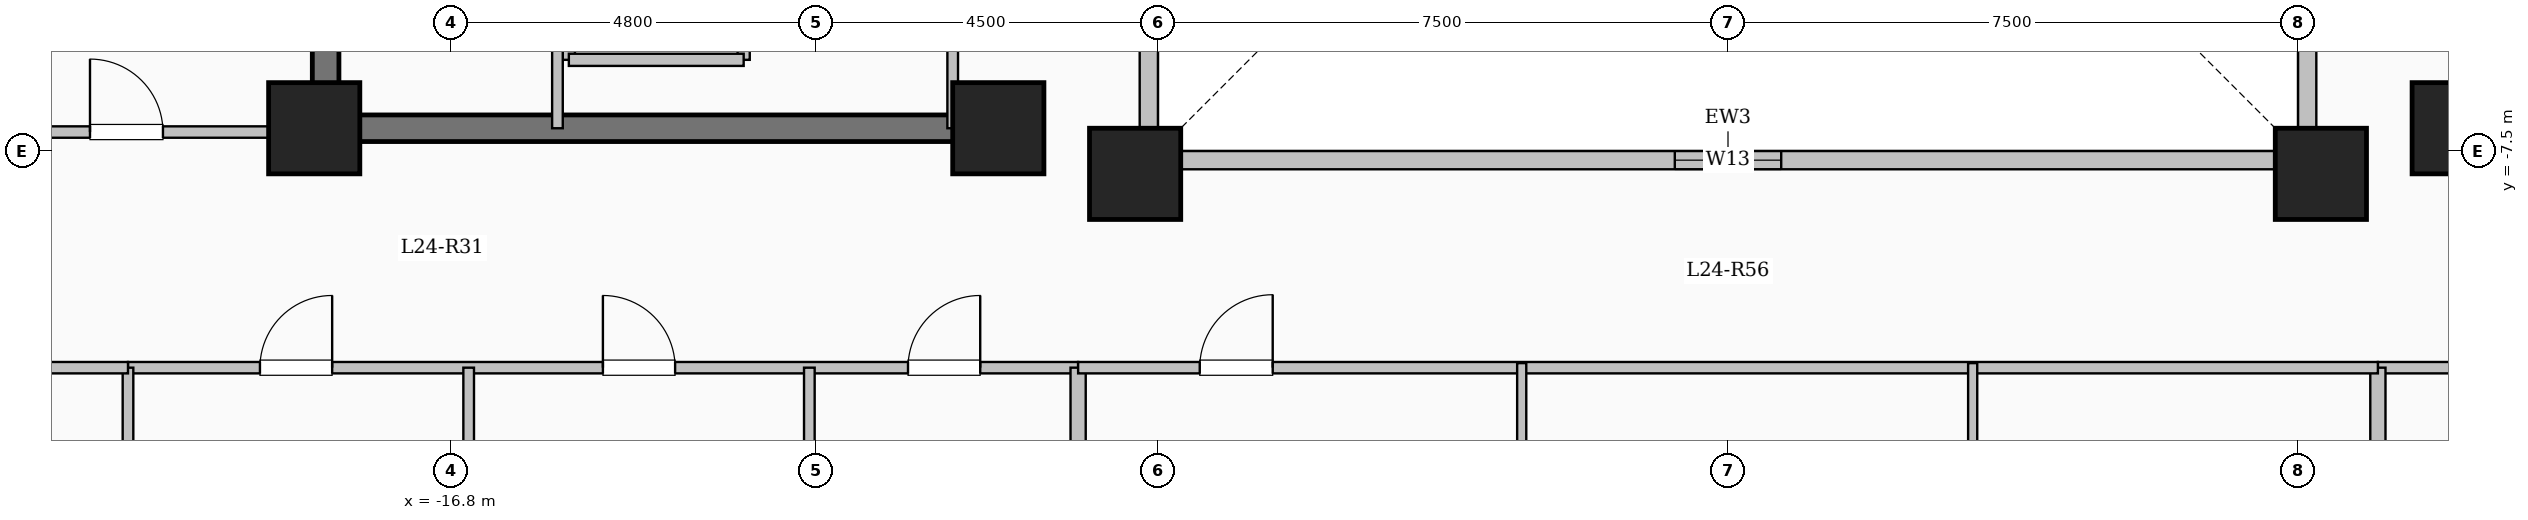
"""IFC4 building model, lengths in metres.
Left out: names, types, materials, properties, quantities, classifications, styles, units other than length and angle.
Written with IfcOpenShell. Run it as: python <this file> out.ifc"""

import sys

from ifc_helpers import new_model, si_unit, direction, frame, frame_2d, origin, origin_2d, place, context, subcontext, project, spatial, rectangle, extrude, element, fill, save


model = new_model("IFC4")
c1 = context("Model", 3, precision=1e-05, world=origin(), true_north=direction((0.0, 1.0)))
c2 = subcontext(c1, "Body", "Model", "MODEL_VIEW")
j1 = project(units=[si_unit("LENGTHUNIT", "METRE"), si_unit("PLANEANGLEUNIT", "RADIAN")], contexts=[c1])
p1 = place(None, origin())
s1 = spatial("IfcSite", under=j1, at=p1, CompositionType="ELEMENT")
p2 = place(p1, origin())
s2 = spatial("IfcBuilding", under=s1, at=p2, CompositionType="ELEMENT")
p3 = place(p2, frame((0.0, 0.0, 91.7)))
s3 = spatial("IfcBuildingStorey", under=s2, at=p3, CompositionType="ELEMENT", Elevation=91.7)
for number, where, z_axis, x_axis in (
    (1, (-7.8, -7.8, 0.0), (0.0, 0.0, 1.0), (1.0, 0.0, 0.0)),
    (2, (7.8, -7.8, 0.0), (0.0, 0.0, 1.0), (1.0, 0.0, 0.0)),
    (3, (-9.6, -7.2, 0.0), (0.0, 0.0, 1.0), (1.0, 0.0, 0.0)),
    (4, (9.6, -7.2, 0.0), (0.0, 0.0, 1.0), (1.0, 0.0, 0.0)),
    (5, (-18.6, -7.2, 0.0), (0.0, 0.0, 1.0), (1.0, 0.0, 0.0)),
):
    element("IfcColumn", number, at=place(p3, frame(where, z_axis=z_axis, x_axis=x_axis)), inside=s3, PredefinedType="COLUMN", context=c2, shape_type="SweptSolid", body=[
        extrude(rectangle(XDim=1.2, YDim=1.2, at=origin_2d()), origin(), (0.0, 0.0, 1.0), 3.35),
    ])
p4 = place(p3, frame((-7.62, -7.62, 0.0), z_axis=(0.0, 0.0, 1.0), x_axis=(1.0, 0.0, 0.0)))
e6 = element("IfcWall", 6, at=p4, inside=s3, PredefinedType="SOLIDWALL", context=c2, shape_type="SweptSolid", body=[
    extrude(rectangle(XDim=15.24, YDim=0.24, at=frame_2d((7.62, 0.0))), origin(), (0.0, 0.0, 1.0), 3.1),
])
p5 = place(p4, frame((6.92, 0.0, 0.95)))
e7 = element("IfcOpeningElement", 7, at=p5, cuts=e6, PredefinedType="OPENING", context=c2, shape_type="SweptSolid", body=[
    extrude(rectangle(XDim=1.4, YDim=1.5, at=frame_2d((0.7, 0.75))), frame((0.0, 0.13, 0.0), z_axis=(0.0, -1.0, 0.0), x_axis=(1.0, 0.0, 0.0)), (0.0, 0.0, 1.0), 0.26),
])
p6 = place(p3, frame((7.62, -7.62, 0.0), z_axis=(0.0, 0.0, 1.0), x_axis=(0.0, 1.0, 0.0)))
e8 = element("IfcWall", 8, at=p6, inside=s3, PredefinedType="SOLIDWALL", context=c2, shape_type="SweptSolid", body=[
    extrude(rectangle(XDim=15.24, YDim=0.24, at=frame_2d((7.62, 0.0))), origin(), (0.0, 0.0, 1.0), 3.1),
])
p7 = place(p6, frame((6.92, 0.0, 0.95)))
e9 = element("IfcOpeningElement", 9, at=p7, cuts=e8, PredefinedType="OPENING", context=c2, shape_type="SweptSolid", body=[
    extrude(rectangle(XDim=1.4, YDim=1.5, at=frame_2d((0.7, 0.75))), frame((0.0, 0.13, 0.0), z_axis=(0.0, -1.0, 0.0), x_axis=(1.0, 0.0, 0.0)), (0.0, 0.0, 1.0), 0.26),
])
p8 = place(p3, frame((-7.62, 7.62, 0.0), z_axis=(0.0, 0.0, 1.0), x_axis=(0.0, -1.0, 0.0)))
e10 = element("IfcWall", 10, at=p8, inside=s3, PredefinedType="SOLIDWALL", context=c2, shape_type="SweptSolid", body=[
    extrude(rectangle(XDim=15.24, YDim=0.24, at=frame_2d((7.62, 0.0))), origin(), (0.0, 0.0, 1.0), 3.1),
])
p9 = place(p8, frame((6.92, 0.0, 0.95)))
e11 = element("IfcOpeningElement", 11, at=p9, cuts=e10, PredefinedType="OPENING", context=c2, shape_type="SweptSolid", body=[
    extrude(rectangle(XDim=1.4, YDim=1.5, at=frame_2d((0.7, 0.75))), frame((0.0, 0.13, 0.0), z_axis=(0.0, -1.0, 0.0), x_axis=(1.0, 0.0, 0.0)), (0.0, 0.0, 1.0), 0.26),
])
for number, where, z_axis, x_axis in (
    (12, (-15.25, -6.3, 0.0), (0.0, 0.0, 1.0), (0.0, 1.0, 0.0)),
    (13, (-12.95, -6.3, 0.0), (0.0, 0.0, 1.0), (0.0, 1.0, 0.0)),
):
    element("IfcWall", number, at=place(p3, frame(where, z_axis=z_axis, x_axis=x_axis)), inside=s3, PredefinedType="SOLIDWALL", context=c2, shape_type="SweptSolid", body=[
        extrude(rectangle(XDim=2.6, YDim=0.16, at=frame_2d((1.3, 0.0))), origin(), (0.0, 0.0, 1.0), 3.1),
    ])
p10 = place(p3, frame((-15.25, -6.3, 0.0), z_axis=(0.0, 0.0, 1.0), x_axis=(1.0, 0.0, 0.0)))
e14 = element("IfcWall", 14, at=p10, inside=s3, PredefinedType="SOLIDWALL", context=c2, shape_type="SweptSolid", body=[
    extrude(rectangle(XDim=2.3, YDim=0.16, at=frame_2d((1.15, 0.0))), origin(), (0.0, 0.0, 1.0), 3.1),
])
p11 = place(p3, frame((-18.45, -7.375, 0.0), z_axis=(0.0, 0.0, 1.0), x_axis=(0.0, 1.0, 0.0)))
e15 = element("IfcWall", 15, at=p11, inside=s3, PredefinedType="SHEAR", context=c2, shape_type="SweptSolid", body=[
    extrude(rectangle(XDim=14.05, YDim=0.35, at=frame_2d((7.025, 0.0))), origin(), (0.0, 0.0, 1.0), 3.35),
])
p12 = place(p3, frame((-18.625, -7.2, 0.0), z_axis=(0.0, 0.0, 1.0), x_axis=(1.0, 0.0, 0.0)))
e16 = element("IfcWall", 16, at=p12, inside=s3, PredefinedType="SHEAR", context=c2, shape_type="SweptSolid", body=[
    extrude(rectangle(XDim=8.55, YDim=0.35, at=frame_2d((4.275, 0.0))), origin(), (0.0, 0.0, 1.0), 3.35),
])
p13 = place(p3, frame((-15.4, -7.2, 0.0), z_axis=(0.0, 0.0, 1.0), x_axis=(0.0, 1.0, 0.0)))
e17 = element("IfcWall", 17, at=p13, inside=s3, PredefinedType="PARTITIONING", context=c2, shape_type="SweptSolid", body=[
    extrude(rectangle(XDim=10.45, YDim=0.14, at=frame_2d((5.225, 0.0))), origin(), (0.0, 0.0, 1.0), 3.1),
])
p14 = place(p13, frame((9.25, 0.0, 0.0)))
e18 = element("IfcOpeningElement", 18, at=p14, cuts=e17, PredefinedType="OPENING", context=c2, shape_type="SweptSolid", body=[
    extrude(rectangle(XDim=0.9, YDim=2.08, at=frame_2d((0.45, 1.04))), frame((0.0, 0.08, 0.0), z_axis=(0.0, -1.0, 0.0), x_axis=(1.0, 0.0, 0.0)), (0.0, 0.0, 1.0), 0.16),
])
p15 = place(p3, frame((-10.2, -7.2, 0.0), z_axis=(0.0, 0.0, 1.0), x_axis=(0.0, 1.0, 0.0)))
e19 = element("IfcWall", 19, at=p15, inside=s3, PredefinedType="PARTITIONING", context=c2, shape_type="SweptSolid", body=[
    extrude(rectangle(XDim=9.12, YDim=0.14, at=frame_2d((4.56, 0.0))), origin(), (0.0, 0.0, 1.0), 3.1),
])
p16 = place(p15, frame((1.9, 0.0, 0.0)))
e20 = element("IfcOpeningElement", 20, at=p16, cuts=e19, PredefinedType="OPENING", context=c2, shape_type="SweptSolid", body=[
    extrude(rectangle(XDim=0.95, YDim=2.12, at=frame_2d((0.475, 1.06))), frame((0.0, 0.08, 0.0), z_axis=(0.0, -1.0, 0.0), x_axis=(1.0, 0.0, 0.0)), (0.0, 0.0, 1.0), 0.16),
])
p17 = place(p15, frame((5.8, 0.0, 0.0)))
e21 = element("IfcOpeningElement", 21, at=p17, cuts=e19, PredefinedType="OPENING", context=c2, shape_type="SweptSolid", body=[
    extrude(rectangle(XDim=0.95, YDim=2.12, at=frame_2d((0.475, 1.06))), frame((0.0, 0.08, 0.0), z_axis=(0.0, -1.0, 0.0), x_axis=(1.0, 0.0, 0.0)), (0.0, 0.0, 1.0), 0.16),
])
p18 = place(p3, frame((-21.05, -10.35, 0.0), z_axis=(0.0, 0.0, 1.0), x_axis=(1.0, 0.0, 0.0)))
e22 = element("IfcWall", 22, at=p18, inside=s3, PredefinedType="PARTITIONING", context=c2, shape_type="SweptSolid", body=[
    extrude(rectangle(XDim=12.5, YDim=0.15, at=frame_2d((6.25, 0.0))), origin(), (0.0, 0.0, 1.0), 3.1),
])
p19 = place(p18, frame((1.736, 0.0, 0.0)))
e23 = element("IfcOpeningElement", 23, at=p19, cuts=e22, PredefinedType="OPENING", context=c2, shape_type="SweptSolid", body=[
    extrude(rectangle(XDim=0.95, YDim=2.15, at=frame_2d((0.475, 1.075))), frame((0.0, 0.085, 0.0), z_axis=(0.0, -1.0, 0.0), x_axis=(1.0, 0.0, 0.0)), (0.0, 0.0, 1.0), 0.17),
])
p20 = place(p18, frame((6.248, 0.0, 0.0)))
e24 = element("IfcOpeningElement", 24, at=p20, cuts=e22, PredefinedType="OPENING", context=c2, shape_type="SweptSolid", body=[
    extrude(rectangle(XDim=0.95, YDim=2.15, at=frame_2d((0.475, 1.075))), frame((0.0, 0.085, 0.0), z_axis=(0.0, -1.0, 0.0), x_axis=(1.0, 0.0, 0.0)), (0.0, 0.0, 1.0), 0.17),
])
p21 = place(p18, frame((10.262, 0.0, 0.0)))
e25 = element("IfcOpeningElement", 25, at=p21, cuts=e22, PredefinedType="OPENING", context=c2, shape_type="SweptSolid", body=[
    extrude(rectangle(XDim=0.95, YDim=2.15, at=frame_2d((0.475, 1.075))), frame((0.0, 0.085, 0.0), z_axis=(0.0, -1.0, 0.0), x_axis=(1.0, 0.0, 0.0)), (0.0, 0.0, 1.0), 0.17),
])
p22 = place(p3, frame((8.55, -10.35, 0.0), z_axis=(0.0, 0.0, 1.0), x_axis=(1.0, 0.0, 0.0)))
e26 = element("IfcWall", 26, at=p22, inside=s3, PredefinedType="PARTITIONING", context=c2, shape_type="SweptSolid", body=[
    extrude(rectangle(XDim=12.5, YDim=0.15, at=frame_2d((6.25, 0.0))), origin(), (0.0, 0.0, 1.0), 3.1),
])
p23 = place(p22, frame((1.786, 0.0, 0.0)))
e27 = element("IfcOpeningElement", 27, at=p23, cuts=e26, PredefinedType="OPENING", context=c2, shape_type="SweptSolid", body=[
    extrude(rectangle(XDim=0.95, YDim=2.15, at=frame_2d((0.475, 1.075))), frame((0.0, 0.085, 0.0), z_axis=(0.0, -1.0, 0.0), x_axis=(1.0, 0.0, 0.0)), (0.0, 0.0, 1.0), 0.17),
])
p24 = place(p22, frame((6.298, 0.0, 0.0)))
e28 = element("IfcOpeningElement", 28, at=p24, cuts=e26, PredefinedType="OPENING", context=c2, shape_type="SweptSolid", body=[
    extrude(rectangle(XDim=0.95, YDim=2.15, at=frame_2d((0.475, 1.075))), frame((0.0, 0.085, 0.0), z_axis=(0.0, -1.0, 0.0), x_axis=(1.0, 0.0, 0.0)), (0.0, 0.0, 1.0), 0.17),
])
p25 = place(p22, frame((10.312, 0.0, 0.0)))
e29 = element("IfcOpeningElement", 29, at=p25, cuts=e26, PredefinedType="OPENING", context=c2, shape_type="SweptSolid", body=[
    extrude(rectangle(XDim=0.95, YDim=2.15, at=frame_2d((0.475, 1.075))), frame((0.0, 0.085, 0.0), z_axis=(0.0, -1.0, 0.0), x_axis=(1.0, 0.0, 0.0)), (0.0, 0.0, 1.0), 0.17),
])
for number, where, z_axis, x_axis in (
    (30, (-16.568, -22.05, 0.0), (0.0, 0.0, 1.0), (0.0, 1.0, 0.0)),
    (31, (-12.086, -22.05, 0.0), (0.0, 0.0, 1.0), (0.0, 1.0, 0.0)),
):
    element("IfcWall", number, at=place(p3, frame(where, z_axis=z_axis, x_axis=x_axis)), inside=s3, PredefinedType="PARTITIONING", context=c2, shape_type="SweptSolid", body=[
        extrude(rectangle(XDim=11.7, YDim=0.14, at=frame_2d((5.85, 0.0))), origin(), (0.0, 0.0, 1.0), 3.1),
    ])
for number, where, z_axis, x_axis in (
    (32, (-8.55, -22.704, 0.0), (0.0, 0.0, 1.0), (0.0, 1.0, 0.0)),
    (33, (8.55, -22.704, 0.0), (0.0, 0.0, 1.0), (0.0, 1.0, 0.0)),
):
    element("IfcWall", number, at=place(p3, frame(where, z_axis=z_axis, x_axis=x_axis)), inside=s3, PredefinedType="SOLIDWALL", context=c2, shape_type="SweptSolid", body=[
        extrude(rectangle(XDim=12.354, YDim=0.2, at=frame_2d((6.177, 0.0))), origin(), (0.0, 0.0, 1.0), 3.1),
    ])
p26 = place(p3, frame((-8.55, -10.35, 0.0), z_axis=(0.0, 0.0, 1.0), x_axis=(1.0, 0.0, 0.0)))
e34 = element("IfcWall", 34, at=p26, inside=s3, PredefinedType="PARTITIONING", context=c2, shape_type="SweptSolid", body=[
    extrude(rectangle(XDim=17.1, YDim=0.15, at=frame_2d((8.55, 0.0))), origin(), (0.0, 0.0, 1.0), 3.1),
])
p27 = place(p26, frame((1.6, 0.0, 0.0)))
e35 = element("IfcOpeningElement", 35, at=p27, cuts=e34, PredefinedType="OPENING", context=c2, shape_type="SweptSolid", body=[
    extrude(rectangle(XDim=0.96, YDim=2.15, at=frame_2d((0.48, 1.075))), frame((0.0, 0.085, 0.0), z_axis=(0.0, -1.0, 0.0), x_axis=(1.0, 0.0, 0.0)), (0.0, 0.0, 1.0), 0.17),
])
p28 = place(p3, frame((-2.714, -23.58, 0.0), z_axis=(0.0, 0.0, 1.0), x_axis=(0.0, 1.0, 0.0)))
e36 = element("IfcWall", 36, at=p28, inside=s3, PredefinedType="PARTITIONING", context=c2, shape_type="SweptSolid", body=[
    extrude(rectangle(XDim=13.29, YDim=0.12, at=frame_2d((6.645, 0.0))), origin(), (0.0, 0.0, 1.0), 3.1),
])
p29 = place(p28, frame((9.465, 0.0, 0.0)))
e37 = element("IfcOpeningElement", 37, at=p29, cuts=e36, PredefinedType="OPENING", context=c2, shape_type="SweptSolid", body=[
    extrude(rectangle(XDim=1.08, YDim=2.15, at=frame_2d((0.54, 1.075))), frame((0.0, 0.07, 0.0), z_axis=(0.0, -1.0, 0.0), x_axis=(1.0, 0.0, 0.0)), (0.0, 0.0, 1.0), 0.14),
])
p30 = place(p3, frame((3.219, -12.75, 0.0), z_axis=(0.0, 0.0, 1.0), x_axis=(0.0, 1.0, 0.0)))
e38 = element("IfcWall", 38, at=p30, inside=s3, PredefinedType="PARTITIONING", context=c2, shape_type="SweptSolid", body=[
    extrude(rectangle(XDim=2.46, YDim=0.12, at=frame_2d((1.23, 0.0))), origin(), (0.0, 0.0, 1.0), 3.1),
])
p31 = place(p3, frame((-26.88, -7.25, 0.0), z_axis=(0.0, 0.0, 1.0), x_axis=(1.0, 0.0, 0.0)))
e39 = element("IfcWall", 39, at=p31, inside=s3, PredefinedType="PARTITIONING", context=c2, shape_type="SweptSolid", body=[
    extrude(rectangle(XDim=8.43, YDim=0.15, at=frame_2d((4.215, 0.0))), origin(), (0.0, 0.0, 1.0), 3.1),
])
p32 = place(p31, frame((5.33, 0.0, 0.0)))
e40 = element("IfcOpeningElement", 40, at=p32, cuts=e39, PredefinedType="OPENING", context=c2, shape_type="SweptSolid", body=[
    extrude(rectangle(XDim=0.96, YDim=2.15, at=frame_2d((0.48, 1.075))), frame((0.0, 0.085, 0.0), z_axis=(0.0, -1.0, 0.0), x_axis=(1.0, 0.0, 0.0)), (0.0, 0.0, 1.0), 0.17),
])
p33 = place(p3, frame((-21.05, -17.85, 0.0), z_axis=(0.0, 0.0, 1.0), x_axis=(0.0, 1.0, 0.0)))
e41 = element("IfcWall", 41, at=p33, inside=s3, PredefinedType="PARTITIONING", context=c2, shape_type="SweptSolid", body=[
    extrude(rectangle(XDim=7.5, YDim=0.14, at=frame_2d((3.75, 0.0))), origin(), (0.0, 0.0, 1.0), 3.1),
])
p34 = place(p3, frame((-26.88, -10.35, 0.0), z_axis=(0.0, 0.0, 1.0), x_axis=(1.0, 0.0, 0.0)))
e42 = element("IfcWall", 42, at=p34, inside=s3, PredefinedType="PARTITIONING", context=c2, shape_type="SweptSolid", body=[
    extrude(rectangle(XDim=5.83, YDim=0.15, at=frame_2d((2.915, 0.0))), origin(), (0.0, 0.0, 1.0), 3.1),
])
p35 = place(p34, frame((2.44, 0.0, 0.0)))
e43 = element("IfcOpeningElement", 43, at=p35, cuts=e42, PredefinedType="OPENING", context=c2, shape_type="SweptSolid", body=[
    extrude(rectangle(XDim=0.95, YDim=2.15, at=frame_2d((0.475, 1.075))), frame((0.0, 0.085, 0.0), z_axis=(0.0, -1.0, 0.0), x_axis=(1.0, 0.0, 0.0)), (0.0, 0.0, 1.0), 0.17),
])
p36 = place(p5, origin())
e44 = element("IfcWindow", 44, at=p36, inside=s3, PartitioningType="SINGLE_PANEL", PredefinedType="WINDOW", context=c2, shape_type="SweptSolid", body=[
    extrude(rectangle(XDim=1.4, YDim=1.5, at=frame_2d((0.7, 0.75))), frame((0.0, 0.03, 0.0), z_axis=(0.0, -1.0, 0.0), x_axis=(1.0, 0.0, 0.0)), (0.0, 0.0, 1.0), 0.06),
])
fill(e7, e44)
p37 = place(p19, origin())
e45 = element("IfcDoor", 45, at=p37, inside=s3, OperationType="SINGLE_SWING_RIGHT", PredefinedType="DOOR", context=c2, shape_type="SweptSolid", body=[
    extrude(rectangle(XDim=0.95, YDim=2.15, at=frame_2d((0.475, 1.075))), frame((0.0, 0.025, 0.0), z_axis=(0.0, -1.0, 0.0), x_axis=(1.0, 0.0, 0.0)), (0.0, 0.0, 1.0), 0.05),
])
fill(e23, e45)
p38 = place(p20, origin())
e46 = element("IfcDoor", 46, at=p38, inside=s3, OperationType="SINGLE_SWING_LEFT", PredefinedType="DOOR", context=c2, shape_type="SweptSolid", body=[
    extrude(rectangle(XDim=0.95, YDim=2.15, at=frame_2d((0.475, 1.075))), frame((0.0, 0.025, 0.0), z_axis=(0.0, -1.0, 0.0), x_axis=(1.0, 0.0, 0.0)), (0.0, 0.0, 1.0), 0.05),
])
fill(e24, e46)
p39 = place(p21, origin())
e47 = element("IfcDoor", 47, at=p39, inside=s3, OperationType="SINGLE_SWING_RIGHT", PredefinedType="DOOR", context=c2, shape_type="SweptSolid", body=[
    extrude(rectangle(XDim=0.95, YDim=2.15, at=frame_2d((0.475, 1.075))), frame((0.0, 0.025, 0.0), z_axis=(0.0, -1.0, 0.0), x_axis=(1.0, 0.0, 0.0)), (0.0, 0.0, 1.0), 0.05),
])
fill(e25, e47)
p40 = place(p27, origin())
e48 = element("IfcDoor", 48, at=p40, inside=s3, OperationType="SINGLE_SWING_RIGHT", PredefinedType="DOOR", context=c2, shape_type="SweptSolid", body=[
    extrude(rectangle(XDim=0.96, YDim=2.15, at=frame_2d((0.48, 1.075))), frame((0.0, 0.025, 0.0), z_axis=(0.0, -1.0, 0.0), x_axis=(1.0, 0.0, 0.0)), (0.0, 0.0, 1.0), 0.05),
])
fill(e35, e48)
p41 = place(p32, origin())
e49 = element("IfcDoor", 49, at=p41, inside=s3, OperationType="SINGLE_SWING_LEFT", PredefinedType="DOOR", context=c2, shape_type="SweptSolid", body=[
    extrude(rectangle(XDim=0.96, YDim=2.15, at=frame_2d((0.48, 1.075))), frame((0.0, 0.025, 0.0), z_axis=(0.0, -1.0, 0.0), x_axis=(1.0, 0.0, 0.0)), (0.0, 0.0, 1.0), 0.05),
])
fill(e40, e49)
save(model, sys.argv[1])
